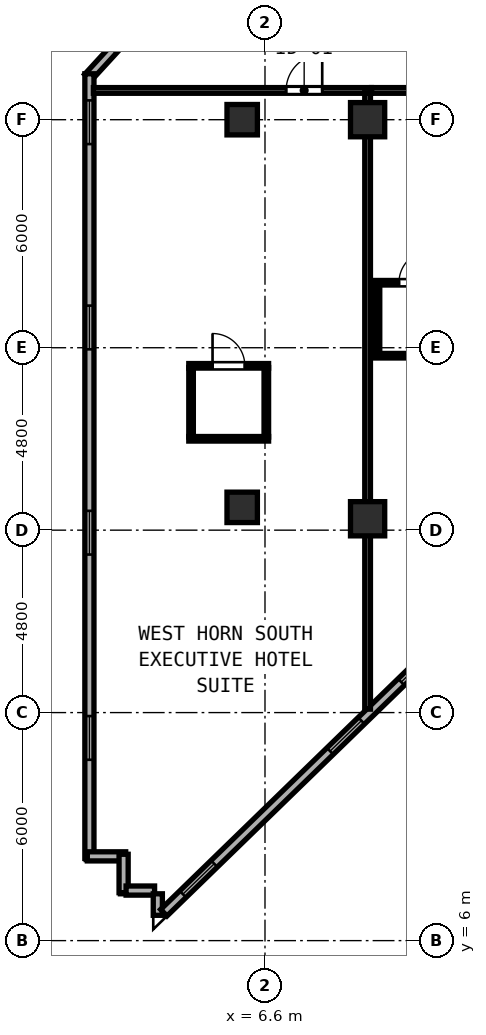
"""IFC4 building model, lengths in metres.
Left out: names, types, materials, properties, quantities, classifications, styles, units other than length and angle.
Written with IfcOpenShell. Run it as: python <this file> out.ifc"""

import sys

from ifc_helpers import new_model, si_unit, direction, frame, frame_2d, origin, origin_2d, place, context, subcontext, project, spatial, rectangle, hollow_rectangle, extrude, element, fill, save


model = new_model("IFC4")
c1 = context("Model", 3, precision=1e-05, world=origin(), true_north=direction((0.0, 1.0)))
c2 = subcontext(c1, "Body", "Model", "MODEL_VIEW")
j1 = project(units=[si_unit("LENGTHUNIT", "METRE"), si_unit("PLANEANGLEUNIT", "RADIAN")], contexts=[c1])
p1 = place(None, origin())
s1 = spatial("IfcSite", under=j1, at=p1, CompositionType="ELEMENT")
p2 = place(p1, origin())
s2 = spatial("IfcBuilding", under=s1, at=p2, CompositionType="ELEMENT")
p3 = place(p2, frame((0.0, 0.0, 121.2)))
s3 = spatial("IfcBuildingStorey", under=s2, at=p3, CompositionType="ELEMENT", Elevation=121.2)
for number, where, z_axis, x_axis in (
    (1, (6.0, 17.4, 0.0), (0.0, 0.0, 1.0), (1.0, 0.0, 0.0)),
    (2, (6.0, 27.6, 0.0), (0.0, 0.0, 1.0), (1.0, 0.0, 0.0)),
):
    element("IfcColumn", number, at=place(p3, frame(where, z_axis=z_axis, x_axis=x_axis)), inside=s3, PredefinedType="COLUMN", context=c2, shape_type="SweptSolid", body=[
        extrude(hollow_rectangle(XDim=0.8, YDim=0.8, WallThickness=0.03, at=origin_2d()), origin(), (0.0, 0.0, 1.0), 3.8),
    ])
for number, where, z_axis, x_axis in (
    (3, (9.3, 17.1, 0.0), (0.0, 0.0, 1.0), (1.0, 0.0, 0.0)),
    (4, (9.3, 27.6, 0.0), (0.0, 0.0, 1.0), (1.0, 0.0, 0.0)),
):
    element("IfcColumn", number, at=place(p3, frame(where, z_axis=z_axis, x_axis=x_axis)), inside=s3, PredefinedType="COLUMN", context=c2, shape_type="SweptSolid", body=[
        extrude(hollow_rectangle(XDim=0.9, YDim=0.9, WallThickness=0.034, at=origin_2d()), origin(), (0.0, 0.0, 1.0), 3.8),
    ])
p4 = place(p3, frame((4.163, 31.135, 0.0), z_axis=(0.0, 0.0, 1.0), x_axis=(-0.675717899837, -0.737160308101, 0.0)))
e5 = element("IfcWall", 5, at=p4, inside=s3, PredefinedType="SOLIDWALL", context=c2, shape_type="SweptSolid", body=[
    extrude(rectangle(XDim=3.286, YDim=0.24, at=frame_2d((1.643, 0.0))), origin(), (0.0, 0.0, 1.0), 3.6),
])
p5 = place(p4, frame((1.163, 0.0, 0.85)))
e6 = element("IfcOpeningElement", 6, at=p5, cuts=e5, PredefinedType="OPENING", context=c2, shape_type="SweptSolid", body=[
    extrude(rectangle(XDim=1.15, YDim=1.8, at=frame_2d((0.575, 0.9))), frame((0.0, 0.13, 0.0), z_axis=(0.0, -1.0, 0.0), x_axis=(1.0, 0.0, 0.0)), (0.0, 0.0, 1.0), 0.26),
])
p6 = place(p3, frame((1.98, 28.808, 0.0), z_axis=(0.0, 0.0, 1.0), x_axis=(0.0, -1.0, 0.0)))
e7 = element("IfcWall", 7, at=p6, inside=s3, PredefinedType="SOLIDWALL", context=c2, shape_type="SweptSolid", body=[
    extrude(rectangle(XDim=20.646, YDim=0.24, at=frame_2d((10.323, 0.0))), origin(), (0.0, 0.0, 1.0), 3.6),
])
p7 = place(p6, frame((0.7, 0.0, 0.85)))
e8 = element("IfcOpeningElement", 8, at=p7, cuts=e7, PredefinedType="OPENING", context=c2, shape_type="SweptSolid", body=[
    extrude(rectangle(XDim=1.15, YDim=1.8, at=frame_2d((0.575, 0.9))), frame((0.0, 0.13, 0.0), z_axis=(0.0, -1.0, 0.0), x_axis=(1.0, 0.0, 0.0)), (0.0, 0.0, 1.0), 0.26),
])
p8 = place(p6, frame((6.1, 0.0, 0.85)))
e9 = element("IfcOpeningElement", 9, at=p8, cuts=e7, PredefinedType="OPENING", context=c2, shape_type="SweptSolid", body=[
    extrude(rectangle(XDim=1.15, YDim=1.8, at=frame_2d((0.575, 0.9))), frame((0.0, 0.13, 0.0), z_axis=(0.0, -1.0, 0.0), x_axis=(1.0, 0.0, 0.0)), (0.0, 0.0, 1.0), 0.26),
])
p9 = place(p6, frame((11.5, 0.0, 0.85)))
e10 = element("IfcOpeningElement", 10, at=p9, cuts=e7, PredefinedType="OPENING", context=c2, shape_type="SweptSolid", body=[
    extrude(rectangle(XDim=1.15, YDim=1.8, at=frame_2d((0.575, 0.9))), frame((0.0, 0.13, 0.0), z_axis=(0.0, -1.0, 0.0), x_axis=(1.0, 0.0, 0.0)), (0.0, 0.0, 1.0), 0.26),
])
p10 = place(p6, frame((16.9, 0.0, 0.85)))
e11 = element("IfcOpeningElement", 11, at=p10, cuts=e7, PredefinedType="OPENING", context=c2, shape_type="SweptSolid", body=[
    extrude(rectangle(XDim=1.15, YDim=1.8, at=frame_2d((0.575, 0.9))), frame((0.0, 0.13, 0.0), z_axis=(0.0, -1.0, 0.0), x_axis=(1.0, 0.0, 0.0)), (0.0, 0.0, 1.0), 0.26),
])
for number, where, z_axis, x_axis in (
    (12, (1.925, 8.217, 0.0), (0.0, 0.0, 1.0), (1.0, 0.0, 0.0)),
    (13, (2.88, 8.272, 0.0), (0.0, 0.0, 1.0), (0.0, -1.0, 0.0)),
):
    element("IfcWall", number, at=place(p3, frame(where, z_axis=z_axis, x_axis=x_axis)), inside=s3, PredefinedType="SOLIDWALL", context=c2, shape_type="SweptSolid", body=[
        extrude(rectangle(XDim=1.01, YDim=0.24, at=frame_2d((0.505, 0.0))), origin(), (0.0, 0.0, 1.0), 3.6),
    ])
p11 = place(p3, frame((2.945, 7.317, 0.0), z_axis=(0.0, 0.0, 1.0), x_axis=(1.0, 0.0, 0.0)))
e14 = element("IfcWall", 14, at=p11, inside=s3, PredefinedType="SOLIDWALL", context=c2, shape_type="SweptSolid", body=[
    extrude(rectangle(XDim=0.75, YDim=0.24, at=frame_2d((0.375, 0.0))), origin(), (0.0, 0.0, 1.0), 3.6),
])
p12 = place(p3, frame((3.78, 7.232, 0.0), z_axis=(0.0, 0.0, 1.0), x_axis=(0.0, -1.0, 0.0)))
e15 = element("IfcWall", 15, at=p12, inside=s3, PredefinedType="SOLIDWALL", context=c2, shape_type="SweptSolid", body=[
    extrude(rectangle(XDim=0.566, YDim=0.24, at=frame_2d((0.283, 0.0))), origin(), (0.0, 0.0, 1.0), 3.6),
])
p13 = place(p3, frame((3.938, 6.734, 0.0), z_axis=(0.0, 0.0, 1.0), x_axis=(0.717223616435, 0.696843084222, 0.0)))
e16 = element("IfcWall", 16, at=p13, inside=s3, PredefinedType="SOLIDWALL", context=c2, shape_type="SweptSolid", body=[
    extrude(rectangle(XDim=11.129, YDim=0.24, at=frame_2d((5.564, 0.0))), origin(), (0.0, 0.0, 1.0), 3.6),
])
p14 = place(p13, frame((0.7, 0.0, 0.85)))
e17 = element("IfcOpeningElement", 17, at=p14, cuts=e16, PredefinedType="OPENING", context=c2, shape_type="SweptSolid", body=[
    extrude(rectangle(XDim=1.15, YDim=1.8, at=frame_2d((0.575, 0.9))), frame((0.0, 0.13, 0.0), z_axis=(0.0, -1.0, 0.0), x_axis=(1.0, 0.0, 0.0)), (0.0, 0.0, 1.0), 0.26),
])
p15 = place(p13, frame((6.1, 0.0, 0.85)))
e18 = element("IfcOpeningElement", 18, at=p15, cuts=e16, PredefinedType="OPENING", context=c2, shape_type="SweptSolid", body=[
    extrude(rectangle(XDim=1.15, YDim=1.8, at=frame_2d((0.575, 0.9))), frame((0.0, 0.13, 0.0), z_axis=(0.0, -1.0, 0.0), x_axis=(1.0, 0.0, 0.0)), (0.0, 0.0, 1.0), 0.26),
])
p16 = place(p13, frame((8.709, 0.0, 0.85)))
e19 = element("IfcOpeningElement", 19, at=p16, cuts=e16, PredefinedType="OPENING", context=c2, shape_type="SweptSolid", body=[
    extrude(rectangle(XDim=1.15, YDim=1.8, at=frame_2d((0.575, 0.9))), frame((0.0, 0.13, 0.0), z_axis=(0.0, -1.0, 0.0), x_axis=(1.0, 0.0, 0.0)), (0.0, 0.0, 1.0), 0.26),
])
p17 = place(p3, frame((2.085, 28.37, 0.0), z_axis=(0.0, 0.0, 1.0), x_axis=(1.0, 0.0, 0.0)))
e20 = element("IfcWall", 20, at=p17, inside=s3, PredefinedType="PARTITIONING", context=c2, shape_type="SweptSolid", body=[
    extrude(rectangle(XDim=7.315, YDim=0.15, at=frame_2d((3.657, 0.0))), origin(), (0.0, 0.0, 1.0), 3.6),
])
p18 = place(p17, frame((6.021, 0.0, 0.0), z_axis=(0.0, 0.0, 1.0), x_axis=(-1.0, 0.0, 0.0)))
e21 = element("IfcOpeningElement", 21, at=p18, cuts=e20, PredefinedType="OPENING", context=c2, shape_type="SweptSolid", body=[
    extrude(rectangle(XDim=0.95, YDim=2.18, at=frame_2d((0.475, 1.09))), frame((0.0, 0.085, 0.0), z_axis=(0.0, -1.0, 0.0), x_axis=(1.0, 0.0, 0.0)), (0.0, 0.0, 1.0), 0.17),
])
p19 = place(p3, frame((9.3, 12.09, 0.0), z_axis=(0.0, 0.0, 1.0), x_axis=(0.0, 1.0, 0.0)))
e22 = element("IfcWall", 22, at=p19, inside=s3, PredefinedType="PARTITIONING", context=c2, shape_type="SweptSolid", body=[
    extrude(rectangle(XDim=16.22, YDim=0.15, at=frame_2d((8.11, 0.0))), origin(), (0.0, 0.0, 1.0), 3.6),
])
p20 = place(p3, frame((4.595, 21.124, 0.0), z_axis=(0.0, 0.0, 1.0), x_axis=(1.0, 0.0, 0.0)))
e23 = element("IfcWall", 23, at=p20, inside=s3, PredefinedType="PARTITIONING", context=c2, shape_type="SweptSolid", body=[
    extrude(rectangle(XDim=2.1, YDim=0.12, at=frame_2d((1.05, 0.0))), origin(), (0.0, 0.0, 1.0), 3.6),
])
p21 = place(p20, frame((1.475, 0.0, 0.0), z_axis=(0.0, 0.0, 1.0), x_axis=(-1.0, 0.0, 0.0)))
e24 = element("IfcOpeningElement", 24, at=p21, cuts=e23, PredefinedType="OPENING", context=c2, shape_type="SweptSolid", body=[
    extrude(rectangle(XDim=0.85, YDim=2.1, at=frame_2d((0.425, 1.05))), frame((0.0, 0.07, 0.0), z_axis=(0.0, -1.0, 0.0), x_axis=(1.0, 0.0, 0.0)), (0.0, 0.0, 1.0), 0.14),
])
p22 = place(p3, frame((4.595, 19.204, 0.0), z_axis=(0.0, 0.0, 1.0), x_axis=(1.0, 0.0, 0.0)))
e25 = element("IfcWall", 25, at=p22, inside=s3, PredefinedType="PARTITIONING", context=c2, shape_type="SweptSolid", body=[
    extrude(rectangle(XDim=2.1, YDim=0.12, at=frame_2d((1.05, 0.0))), origin(), (0.0, 0.0, 1.0), 3.6),
])
for number, where, z_axis, x_axis in (
    (26, (4.655, 19.249, 0.0), (0.0, 0.0, 1.0), (0.0, 1.0, 0.0)),
    (27, (6.635, 19.249, 0.0), (0.0, 0.0, 1.0), (0.0, 1.0, 0.0)),
):
    element("IfcWall", number, at=place(p3, frame(where, z_axis=z_axis, x_axis=x_axis)), inside=s3, PredefinedType="PARTITIONING", context=c2, shape_type="SweptSolid", body=[
        extrude(rectangle(XDim=1.83, YDim=0.12, at=frame_2d((0.915, 0.0))), origin(), (0.0, 0.0, 1.0), 3.6),
    ])
p23 = place(p3, frame((9.402, 28.37, 0.0), z_axis=(0.0, 0.0, 1.0), x_axis=(1.0, 0.0, 0.0)))
e28 = element("IfcWall", 28, at=p23, inside=s3, PredefinedType="PARTITIONING", context=c2, shape_type="SweptSolid", body=[
    extrude(rectangle(XDim=2.296, YDim=0.15, at=frame_2d((1.148, 0.0))), origin(), (0.0, 0.0, 1.0), 3.6),
])
p24 = place(p23, frame((1.934, 0.0, 0.0), z_axis=(0.0, 0.0, 1.0), x_axis=(-1.0, 0.0, 0.0)))
e29 = element("IfcOpeningElement", 29, at=p24, cuts=e28, PredefinedType="OPENING", context=c2, shape_type="SweptSolid", body=[
    extrude(rectangle(XDim=0.95, YDim=2.15, at=frame_2d((0.475, 1.075))), frame((0.0, 0.085, 0.0), z_axis=(0.0, -1.0, 0.0), x_axis=(1.0, 0.0, 0.0)), (0.0, 0.0, 1.0), 0.17),
])
p25 = place(p3, frame((9.5, 23.31, 0.0), z_axis=(0.0, 0.0, 1.0), x_axis=(1.0, 0.0, 0.0)))
e30 = element("IfcWall", 30, at=p25, inside=s3, PredefinedType="PARTITIONING", context=c2, shape_type="SweptSolid", body=[
    extrude(rectangle(XDim=2.1, YDim=0.12, at=frame_2d((1.05, 0.0))), origin(), (0.0, 0.0, 1.0), 3.6),
])
p26 = place(p25, frame((1.475, 0.0, 0.0), z_axis=(0.0, 0.0, 1.0), x_axis=(-1.0, 0.0, 0.0)))
e31 = element("IfcOpeningElement", 31, at=p26, cuts=e30, PredefinedType="OPENING", context=c2, shape_type="SweptSolid", body=[
    extrude(rectangle(XDim=0.85, YDim=2.1, at=frame_2d((0.425, 1.05))), frame((0.0, 0.07, 0.0), z_axis=(0.0, -1.0, 0.0), x_axis=(1.0, 0.0, 0.0)), (0.0, 0.0, 1.0), 0.14),
])
p27 = place(p3, frame((9.5, 21.39, 0.0), z_axis=(0.0, 0.0, 1.0), x_axis=(1.0, 0.0, 0.0)))
e32 = element("IfcWall", 32, at=p27, inside=s3, PredefinedType="PARTITIONING", context=c2, shape_type="SweptSolid", body=[
    extrude(rectangle(XDim=2.1, YDim=0.12, at=frame_2d((1.05, 0.0))), origin(), (0.0, 0.0, 1.0), 3.6),
])
p28 = place(p3, frame((9.56, 21.435, 0.0), z_axis=(0.0, 0.0, 1.0), x_axis=(0.0, 1.0, 0.0)))
e33 = element("IfcWall", 33, at=p28, inside=s3, PredefinedType="PARTITIONING", context=c2, shape_type="SweptSolid", body=[
    extrude(rectangle(XDim=1.83, YDim=0.12, at=frame_2d((0.915, 0.0))), origin(), (0.0, 0.0, 1.0), 3.6),
])
p29 = place(p7, origin())
e34 = element("IfcWindow", 34, at=p29, inside=s3, PartitioningType="SINGLE_PANEL", PredefinedType="WINDOW", context=c2, shape_type="SweptSolid", body=[
    extrude(rectangle(XDim=1.15, YDim=1.8, at=frame_2d((0.575, 0.9))), frame((0.0, 0.03, 0.0), z_axis=(0.0, -1.0, 0.0), x_axis=(1.0, 0.0, 0.0)), (0.0, 0.0, 1.0), 0.06),
])
fill(e8, e34)
p30 = place(p8, origin())
e35 = element("IfcWindow", 35, at=p30, inside=s3, PartitioningType="SINGLE_PANEL", PredefinedType="WINDOW", context=c2, shape_type="SweptSolid", body=[
    extrude(rectangle(XDim=1.15, YDim=1.8, at=frame_2d((0.575, 0.9))), frame((0.0, 0.03, 0.0), z_axis=(0.0, -1.0, 0.0), x_axis=(1.0, 0.0, 0.0)), (0.0, 0.0, 1.0), 0.06),
])
fill(e9, e35)
p31 = place(p9, origin())
e36 = element("IfcWindow", 36, at=p31, inside=s3, PartitioningType="SINGLE_PANEL", PredefinedType="WINDOW", context=c2, shape_type="SweptSolid", body=[
    extrude(rectangle(XDim=1.15, YDim=1.8, at=frame_2d((0.575, 0.9))), frame((0.0, 0.03, 0.0), z_axis=(0.0, -1.0, 0.0), x_axis=(1.0, 0.0, 0.0)), (0.0, 0.0, 1.0), 0.06),
])
fill(e10, e36)
p32 = place(p10, origin())
e37 = element("IfcWindow", 37, at=p32, inside=s3, PartitioningType="SINGLE_PANEL", PredefinedType="WINDOW", context=c2, shape_type="SweptSolid", body=[
    extrude(rectangle(XDim=1.15, YDim=1.8, at=frame_2d((0.575, 0.9))), frame((0.0, 0.03, 0.0), z_axis=(0.0, -1.0, 0.0), x_axis=(1.0, 0.0, 0.0)), (0.0, 0.0, 1.0), 0.06),
])
fill(e11, e37)
p33 = place(p14, origin())
e38 = element("IfcWindow", 38, at=p33, inside=s3, PartitioningType="SINGLE_PANEL", PredefinedType="WINDOW", context=c2, shape_type="SweptSolid", body=[
    extrude(rectangle(XDim=1.15, YDim=1.8, at=frame_2d((0.575, 0.9))), frame((0.0, 0.03, 0.0), z_axis=(0.0, -1.0, 0.0), x_axis=(1.0, 0.0, 0.0)), (0.0, 0.0, 1.0), 0.06),
])
fill(e17, e38)
p34 = place(p15, origin())
e39 = element("IfcWindow", 39, at=p34, inside=s3, PartitioningType="SINGLE_PANEL", PredefinedType="WINDOW", context=c2, shape_type="SweptSolid", body=[
    extrude(rectangle(XDim=1.15, YDim=1.8, at=frame_2d((0.575, 0.9))), frame((0.0, 0.03, 0.0), z_axis=(0.0, -1.0, 0.0), x_axis=(1.0, 0.0, 0.0)), (0.0, 0.0, 1.0), 0.06),
])
fill(e18, e39)
p35 = place(p18, origin())
e40 = element("IfcDoor", 40, at=p35, inside=s3, OperationType="SINGLE_SWING_LEFT", PredefinedType="DOOR", context=c2, shape_type="SweptSolid", body=[
    extrude(rectangle(XDim=0.95, YDim=2.18, at=frame_2d((0.475, 1.09))), frame((0.0, 0.025, 0.0), z_axis=(0.0, -1.0, 0.0), x_axis=(1.0, 0.0, 0.0)), (0.0, 0.0, 1.0), 0.05),
])
fill(e21, e40)
p36 = place(p21, origin())
e41 = element("IfcDoor", 41, at=p36, inside=s3, OperationType="SINGLE_SWING_RIGHT", PredefinedType="DOOR", context=c2, shape_type="SweptSolid", body=[
    extrude(rectangle(XDim=0.85, YDim=2.1, at=frame_2d((0.425, 1.05))), frame((0.0, 0.025, 0.0), z_axis=(0.0, -1.0, 0.0), x_axis=(1.0, 0.0, 0.0)), (0.0, 0.0, 1.0), 0.05),
])
fill(e24, e41)
p37 = place(p26, origin())
e42 = element("IfcDoor", 42, at=p37, inside=s3, OperationType="SINGLE_SWING_LEFT", PredefinedType="DOOR", context=c2, shape_type="SweptSolid", body=[
    extrude(rectangle(XDim=0.85, YDim=2.1, at=frame_2d((0.425, 1.05))), frame((0.0, 0.025, 0.0), z_axis=(0.0, -1.0, 0.0), x_axis=(1.0, 0.0, 0.0)), (0.0, 0.0, 1.0), 0.05),
])
fill(e31, e42)
p38 = place(p16, origin())
e43 = element("IfcWindow", 43, at=p38, inside=s3, PartitioningType="SINGLE_PANEL", PredefinedType="WINDOW", context=c2, shape_type="SweptSolid", body=[
    extrude(rectangle(XDim=1.15, YDim=1.8, at=frame_2d((0.575, 0.9))), frame((0.0, 0.03, 0.0), z_axis=(0.0, -1.0, 0.0), x_axis=(1.0, 0.0, 0.0)), (0.0, 0.0, 1.0), 0.06),
])
fill(e19, e43)
save(model, sys.argv[1])
